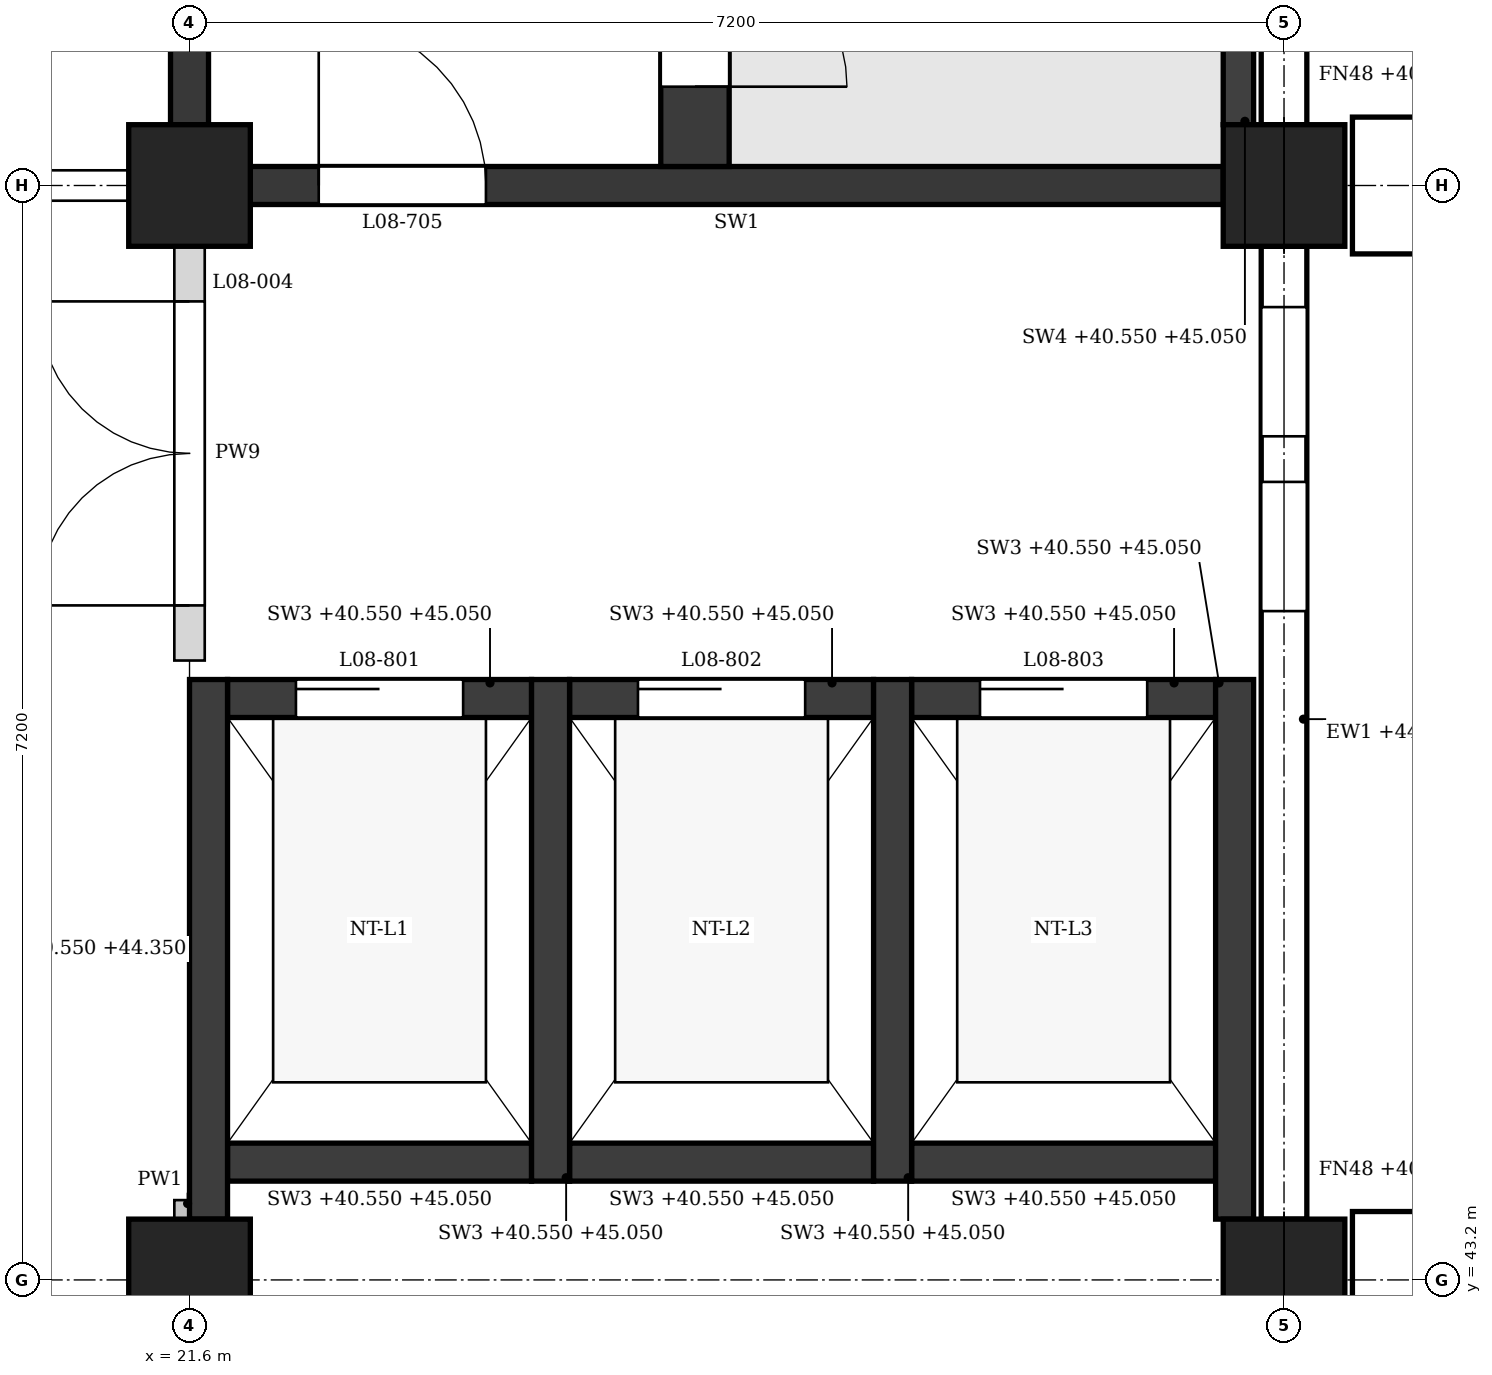
"""IFC4 building model, lengths in metres.
Left out: names, types, materials, properties, quantities, classifications, styles, units other than length and angle.
Written with IfcOpenShell. Run it as: python <this file> out.ifc"""

import sys

from ifc_helpers import new_model, si_unit, direction, frame, frame_2d, origin, origin_2d, place, context, subcontext, project, spatial, polyline, rectangle, outline, extrude, element, fill, save


model = new_model("IFC4")
c1 = context("Model", 3, precision=1e-05, world=origin(), true_north=direction((0.0, 1.0)))
c2 = subcontext(c1, "Body", "Model", "MODEL_VIEW")
j1 = project(units=[si_unit("LENGTHUNIT", "METRE"), si_unit("PLANEANGLEUNIT", "RADIAN")], contexts=[c1])
p1 = place(None, origin())
s1 = spatial("IfcSite", under=j1, at=p1, CompositionType="ELEMENT")
p2 = place(p1, origin())
s2 = spatial("IfcBuilding", under=s1, at=p2, CompositionType="ELEMENT")
p3 = place(p2, frame((0.0, 0.0, 40.8)))
s3 = spatial("IfcBuildingStorey", under=s2, at=p3, CompositionType="ELEMENT", Elevation=40.8)
for number, where, z_axis, x_axis in (
    (1, (21.6, 43.2, 0.0), (0.0, 0.0, 1.0), (1.0, 0.0, 0.0)),
    (2, (21.6, 50.4, 0.0), (0.0, 0.0, 1.0), (1.0, 0.0, 0.0)),
    (3, (28.8, 43.2, 0.0), (0.0, 0.0, 1.0), (1.0, 0.0, 0.0)),
    (4, (28.8, 50.4, 0.0), (0.0, 0.0, 1.0), (1.0, 0.0, 0.0)),
):
    element("IfcColumn", number, at=place(p3, frame(where, z_axis=z_axis, x_axis=x_axis)), inside=s3, PredefinedType="COLUMN", context=c2, shape_type="SweptSolid", body=[
        extrude(rectangle(XDim=0.8, YDim=0.8, at=origin_2d()), origin(), (0.0, 0.0, 1.0), 4.5),
    ])
p4 = place(p3, frame((28.8, 43.6, 0.0), z_axis=(0.0, 0.0, 1.0), x_axis=(0.0, 1.0, 0.0)))
e5 = element("IfcWall", 5, at=p4, inside=s3, PredefinedType="STANDARD", context=c2, shape_type="SweptSolid", body=[
    extrude(rectangle(XDim=6.4, YDim=0.3, at=frame_2d((3.2, 0.0))), origin(), (0.0, 0.0, 1.0), 3.65),
])
p5 = place(p4, frame((4.0, 0.0, 0.9)))
e6 = element("IfcOpeningElement", 6, at=p5, cuts=e5, PredefinedType="OPENING", context=c2, shape_type="SweptSolid", body=[
    extrude(outline(polyline([(0.0, 0.0), (0.85, 0.0), (0.85, 2.25), (0.425, 2.7), (0.0, 2.25), (0.0, 0.0)])), frame((0.0, 0.16, 0.0), z_axis=(0.0, -1.0, 0.0), x_axis=(1.0, 0.0, 0.0)), (0.0, 0.0, 1.0), 0.32),
])
p6 = place(p4, frame((5.15, 0.0, 0.9)))
e7 = element("IfcOpeningElement", 7, at=p6, cuts=e5, PredefinedType="OPENING", context=c2, shape_type="SweptSolid", body=[
    extrude(outline(polyline([(0.0, 0.0), (0.85, 0.0), (0.85, 2.25), (0.425, 2.7), (0.0, 2.25), (0.0, 0.0)])), frame((0.0, 0.16, 0.0), z_axis=(0.0, -1.0, 0.0), x_axis=(1.0, 0.0, 0.0)), (0.0, 0.0, 1.0), 0.32),
])
p7 = place(p3, frame((28.8, 50.8, 0.0), z_axis=(0.0, 0.0, 1.0), x_axis=(0.0, 1.0, 0.0)))
e8 = element("IfcWall", 8, at=p7, inside=s3, PredefinedType="STANDARD", context=c2, shape_type="SweptSolid", body=[
    extrude(rectangle(XDim=6.4, YDim=0.3, at=frame_2d((3.2, 0.0))), origin(), (0.0, 0.0, 1.0), 3.65),
])
p8 = place(p7, frame((0.95, 0.0, 0.9)))
e9 = element("IfcOpeningElement", 9, at=p8, cuts=e8, PredefinedType="OPENING", context=c2, shape_type="SweptSolid", body=[
    extrude(outline(polyline([(0.0, 0.0), (0.9, 0.0), (0.9, 2.25), (0.45, 2.7), (0.0, 2.25), (0.0, 0.0)])), frame((0.0, 0.16, 0.0), z_axis=(0.0, -1.0, 0.0), x_axis=(1.0, 0.0, 0.0)), (0.0, 0.0, 1.0), 0.32),
])
p9 = place(p7, frame((4.55, 0.0, 0.9)))
e10 = element("IfcOpeningElement", 10, at=p9, cuts=e8, PredefinedType="OPENING", context=c2, shape_type="SweptSolid", body=[
    extrude(outline(polyline([(0.0, 0.0), (0.9, 0.0), (0.9, 2.25), (0.45, 2.7), (0.0, 2.25), (0.0, 0.0)])), frame((0.0, 0.16, 0.0), z_axis=(0.0, -1.0, 0.0), x_axis=(1.0, 0.0, 0.0)), (0.0, 0.0, 1.0), 0.32),
])
for number, where, z_axis, x_axis in (
    (11, (29.25, 43.2, -0.25), (0.0, 0.0, 1.0), (1.0, 0.0, 0.0)),
    (12, (29.25, 50.4, -0.25), (0.0, 0.0, 1.0), (1.0, 0.0, 0.0)),
):
    element("IfcWall", number, at=place(p3, frame(where, z_axis=z_axis, x_axis=x_axis)), inside=s3, PredefinedType="POLYGONAL", context=c2, shape_type="SweptSolid", body=[
        extrude(outline(polyline([(1.1, 0.0), (1.1, 12.325), (0.15, 13.75), (0.0, 13.75), (0.0, 0.0), (1.1, 0.0)])), frame((0.0, 0.45, 0.0), z_axis=(0.0, -1.0, 0.0), x_axis=(1.0, 0.0, 0.0)), (0.0, 0.0, 1.0), 0.9),
    ])
p10 = place(p3, frame((22.0, 50.4, 0.0), z_axis=(0.0, 0.0, 1.0), x_axis=(1.0, 0.0, 0.0)))
e13 = element("IfcWall", 13, at=p10, inside=s3, PredefinedType="SHEAR", context=c2, shape_type="SweptSolid", body=[
    extrude(rectangle(XDim=6.4, YDim=0.25, at=frame_2d((3.2, 0.0))), origin(), (0.0, 0.0, 1.0), 3.55),
])
p11 = place(p10, frame((0.45, 0.0, 0.0)))
e14 = element("IfcOpeningElement", 14, at=p11, cuts=e13, PredefinedType="OPENING", context=c2, shape_type="SweptSolid", body=[
    extrude(rectangle(XDim=1.1, YDim=2.1, at=frame_2d((0.55, 1.05))), frame((0.0, 0.135, 0.0), z_axis=(0.0, -1.0, 0.0), x_axis=(1.0, 0.0, 0.0)), (0.0, 0.0, 1.0), 0.27),
])
p12 = place(p3, frame((21.6, 50.8, 0.0), z_axis=(0.0, 0.0, 1.0), x_axis=(0.0, 1.0, 0.0)))
e15 = element("IfcWall", 15, at=p12, inside=s3, PredefinedType="SHEAR", context=c2, shape_type="SweptSolid", body=[
    extrude(rectangle(XDim=6.4, YDim=0.25, at=frame_2d((3.2, 0.0))), origin(), (0.0, 0.0, 1.0), 3.55),
])
p13 = place(p3, frame((28.5, 50.8, -0.25), z_axis=(0.0, 0.0, 1.0), x_axis=(0.0, 1.0, 0.0)))
e16 = element("IfcWall", 16, at=p13, inside=s3, PredefinedType="SHEAR", context=c2, shape_type="SweptSolid", body=[
    extrude(rectangle(XDim=0.95, YDim=0.2, at=frame_2d((0.475, 0.0))), origin(), (0.0, 0.0, 1.0), 4.5),
])
p14 = place(p3, frame((24.925, 50.525, 0.0), z_axis=(0.0, 0.0, 1.0), x_axis=(0.0, 1.0, 0.0)))
e17 = element("IfcWall", 17, at=p14, inside=s3, PredefinedType="SHEAR", context=c2, shape_type="SweptSolid", body=[
    extrude(rectangle(XDim=6.925, YDim=0.45, at=frame_2d((3.462, 0.0))), origin(), (0.0, 0.0, 1.0), 4.25),
])
p15 = place(p14, frame((0.525, 0.0, 0.0)))
e18 = element("IfcOpeningElement", 18, at=p15, cuts=e17, PredefinedType="OPENING", context=c2, shape_type="SweptSolid", body=[
    extrude(rectangle(XDim=1.0, YDim=2.1, at=frame_2d((0.5, 1.05))), frame((0.0, 0.235, 0.0), z_axis=(0.0, -1.0, 0.0), x_axis=(1.0, 0.0, 0.0)), (0.0, 0.0, 1.0), 0.47),
])
p16 = place(p3, frame((21.725, 43.6, -0.25), z_axis=(0.0, 0.0, 1.0), x_axis=(0.0, 1.0, 0.0)))
e19 = element("IfcWall", 19, at=p16, inside=s3, PredefinedType="SHEAR", context=c2, shape_type="SweptSolid", body=[
    extrude(rectangle(XDim=3.55, YDim=0.25, at=frame_2d((1.775, 0.0))), origin(), (0.0, 0.0, 1.0), 3.8),
])
for number, where, z_axis, x_axis in (
    (20, (23.975, 43.85, -0.25), (0.0, 0.0, 1.0), (0.0, 1.0, 0.0)),
    (21, (26.225, 43.85, -0.25), (0.0, 0.0, 1.0), (0.0, 1.0, 0.0)),
):
    element("IfcWall", number, at=place(p3, frame(where, z_axis=z_axis, x_axis=x_axis)), inside=s3, PredefinedType="SHEAR", context=c2, shape_type="SweptSolid", body=[
        extrude(rectangle(XDim=3.3, YDim=0.25, at=frame_2d((1.65, 0.0))), origin(), (0.0, 0.0, 1.0), 4.5),
    ])
p17 = place(p3, frame((28.475, 43.6, -0.25), z_axis=(0.0, 0.0, 1.0), x_axis=(0.0, 1.0, 0.0)))
e22 = element("IfcWall", 22, at=p17, inside=s3, PredefinedType="SHEAR", context=c2, shape_type="SweptSolid", body=[
    extrude(rectangle(XDim=3.55, YDim=0.25, at=frame_2d((1.775, 0.0))), origin(), (0.0, 0.0, 1.0), 4.5),
])
p18 = place(p3, frame((21.85, 47.025, -0.25), z_axis=(0.0, 0.0, 1.0), x_axis=(1.0, 0.0, 0.0)))
e23 = element("IfcWall", 23, at=p18, inside=s3, PredefinedType="SHEAR", context=c2, shape_type="SweptSolid", body=[
    extrude(rectangle(XDim=2.0, YDim=0.25, at=frame_2d((1.0, 0.0))), origin(), (0.0, 0.0, 1.0), 4.5),
])
p19 = place(p18, frame((0.45, 0.0, 0.25)))
e24 = element("IfcOpeningElement", 24, at=p19, cuts=e23, PredefinedType="OPENING", context=c2, shape_type="SweptSolid", body=[
    extrude(rectangle(XDim=1.1, YDim=2.1, at=frame_2d((0.55, 1.05))), frame((0.0, 0.135, 0.0), z_axis=(0.0, -1.0, 0.0), x_axis=(1.0, 0.0, 0.0)), (0.0, 0.0, 1.0), 0.27),
])
p20 = place(p3, frame((21.85, 43.975, -0.25), z_axis=(0.0, 0.0, 1.0), x_axis=(1.0, 0.0, 0.0)))
e25 = element("IfcWall", 25, at=p20, inside=s3, PredefinedType="SHEAR", context=c2, shape_type="SweptSolid", body=[
    extrude(rectangle(XDim=2.0, YDim=0.25, at=frame_2d((1.0, 0.0))), origin(), (0.0, 0.0, 1.0), 4.5),
])
p21 = place(p3, frame((24.1, 47.025, -0.25), z_axis=(0.0, 0.0, 1.0), x_axis=(1.0, 0.0, 0.0)))
e26 = element("IfcWall", 26, at=p21, inside=s3, PredefinedType="SHEAR", context=c2, shape_type="SweptSolid", body=[
    extrude(rectangle(XDim=2.0, YDim=0.25, at=frame_2d((1.0, 0.0))), origin(), (0.0, 0.0, 1.0), 4.5),
])
p22 = place(p21, frame((0.45, 0.0, 0.25)))
e27 = element("IfcOpeningElement", 27, at=p22, cuts=e26, PredefinedType="OPENING", context=c2, shape_type="SweptSolid", body=[
    extrude(rectangle(XDim=1.1, YDim=2.1, at=frame_2d((0.55, 1.05))), frame((0.0, 0.135, 0.0), z_axis=(0.0, -1.0, 0.0), x_axis=(1.0, 0.0, 0.0)), (0.0, 0.0, 1.0), 0.27),
])
p23 = place(p3, frame((24.1, 43.975, -0.25), z_axis=(0.0, 0.0, 1.0), x_axis=(1.0, 0.0, 0.0)))
e28 = element("IfcWall", 28, at=p23, inside=s3, PredefinedType="SHEAR", context=c2, shape_type="SweptSolid", body=[
    extrude(rectangle(XDim=2.0, YDim=0.25, at=frame_2d((1.0, 0.0))), origin(), (0.0, 0.0, 1.0), 4.5),
])
p24 = place(p3, frame((26.35, 47.025, -0.25), z_axis=(0.0, 0.0, 1.0), x_axis=(1.0, 0.0, 0.0)))
e29 = element("IfcWall", 29, at=p24, inside=s3, PredefinedType="SHEAR", context=c2, shape_type="SweptSolid", body=[
    extrude(rectangle(XDim=2.0, YDim=0.25, at=frame_2d((1.0, 0.0))), origin(), (0.0, 0.0, 1.0), 4.5),
])
p25 = place(p24, frame((0.45, 0.0, 0.25)))
e30 = element("IfcOpeningElement", 30, at=p25, cuts=e29, PredefinedType="OPENING", context=c2, shape_type="SweptSolid", body=[
    extrude(rectangle(XDim=1.1, YDim=2.1, at=frame_2d((0.55, 1.05))), frame((0.0, 0.135, 0.0), z_axis=(0.0, -1.0, 0.0), x_axis=(1.0, 0.0, 0.0)), (0.0, 0.0, 1.0), 0.27),
])
p26 = place(p3, frame((26.35, 43.975, -0.25), z_axis=(0.0, 0.0, 1.0), x_axis=(1.0, 0.0, 0.0)))
e31 = element("IfcWall", 31, at=p26, inside=s3, PredefinedType="SHEAR", context=c2, shape_type="SweptSolid", body=[
    extrude(rectangle(XDim=2.0, YDim=0.25, at=frame_2d((1.0, 0.0))), origin(), (0.0, 0.0, 1.0), 4.5),
])
p27 = place(p3, frame((14.8, 50.4, 0.0), z_axis=(0.0, 0.0, 1.0), x_axis=(1.0, 0.0, 0.0)))
e32 = element("IfcWall", 32, at=p27, inside=s3, PredefinedType="PARTITIONING", context=c2, shape_type="SweptSolid", body=[
    extrude(rectangle(XDim=6.4, YDim=0.2, at=frame_2d((3.2, 0.0))), origin(), (0.0, 0.0, 1.0), 3.55),
])
p28 = place(p27, frame((4.3, 0.0, 0.0)))
e33 = element("IfcOpeningElement", 33, at=p28, cuts=e32, PredefinedType="OPENING", context=c2, shape_type="SweptSolid", body=[
    extrude(rectangle(XDim=1.0, YDim=2.1, at=frame_2d((0.5, 1.05))), frame((0.0, 0.11, 0.0), z_axis=(0.0, -1.0, 0.0), x_axis=(1.0, 0.0, 0.0)), (0.0, 0.0, 1.0), 0.22),
])
p29 = place(p3, frame((21.6, 43.6, 0.0), z_axis=(0.0, 0.0, 1.0), x_axis=(0.0, 1.0, 0.0)))
e34 = element("IfcWall", 34, at=p29, inside=s3, PredefinedType="PARTITIONING", context=c2, shape_type="SweptSolid", body=[
    extrude(rectangle(XDim=0.125, YDim=0.2, at=frame_2d((0.062, 0.0))), origin(), (0.0, 0.0, 1.0), 3.55),
])
p30 = place(p3, frame((21.6, 47.275, 0.0), z_axis=(0.0, 0.0, 1.0), x_axis=(0.0, 1.0, 0.0)))
e35 = element("IfcWall", 35, at=p30, inside=s3, PredefinedType="PARTITIONING", context=c2, shape_type="SweptSolid", body=[
    extrude(rectangle(XDim=2.725, YDim=0.2, at=frame_2d((1.363, 0.0))), origin(), (0.0, 0.0, 1.0), 3.55),
])
p31 = place(p30, frame((0.363, 0.0, 0.0)))
e36 = element("IfcOpeningElement", 36, at=p31, cuts=e35, PredefinedType="OPENING", context=c2, shape_type="SweptSolid", body=[
    extrude(rectangle(XDim=2.0, YDim=2.4, at=frame_2d((1.0, 1.2))), frame((0.0, 0.11, 0.0), z_axis=(0.0, -1.0, 0.0), x_axis=(1.0, 0.0, 0.0)), (0.0, 0.0, 1.0), 0.22),
])
p32 = place(p5, origin())
e37 = element("IfcWindow", 37, at=p32, inside=s3, PartitioningType="SINGLE_PANEL", PredefinedType="WINDOW", context=c2, shape_type="SweptSolid", body=[
    extrude(outline(polyline([(0.0, 0.0), (0.85, 0.0), (0.85, 2.25), (0.425, 2.7), (0.0, 2.25), (0.0, 0.0)])), frame((0.0, 0.03, 0.0), z_axis=(0.0, -1.0, 0.0), x_axis=(1.0, 0.0, 0.0)), (0.0, 0.0, 1.0), 0.06),
])
fill(e6, e37)
p33 = place(p6, origin())
e38 = element("IfcWindow", 38, at=p33, inside=s3, PartitioningType="SINGLE_PANEL", PredefinedType="WINDOW", context=c2, shape_type="SweptSolid", body=[
    extrude(outline(polyline([(0.0, 0.0), (0.85, 0.0), (0.85, 2.25), (0.425, 2.7), (0.0, 2.25), (0.0, 0.0)])), frame((0.0, 0.03, 0.0), z_axis=(0.0, -1.0, 0.0), x_axis=(1.0, 0.0, 0.0)), (0.0, 0.0, 1.0), 0.06),
])
fill(e7, e38)
p34 = place(p15, frame((1.0, 0.0, 0.0), z_axis=(0.0, 0.0, 1.0), x_axis=(-1.0, 0.0, 0.0)))
e39 = element("IfcDoor", 39, at=p34, inside=s3, OperationType="SINGLE_SWING_RIGHT", PredefinedType="DOOR", context=c2, shape_type="SweptSolid", body=[
    extrude(rectangle(XDim=1.0, YDim=2.1, at=frame_2d((0.5, 1.05))), frame((0.0, 0.025, 0.0), z_axis=(0.0, -1.0, 0.0), x_axis=(1.0, 0.0, 0.0)), (0.0, 0.0, 1.0), 0.05),
])
fill(e18, e39)
p35 = place(p11, origin())
e40 = element("IfcDoor", 40, at=p35, inside=s3, OperationType="SINGLE_SWING_LEFT", PredefinedType="DOOR", context=c2, shape_type="SweptSolid", body=[
    extrude(rectangle(XDim=1.1, YDim=2.1, at=frame_2d((0.55, 1.05))), frame((0.0, 0.025, 0.0), z_axis=(0.0, -1.0, 0.0), x_axis=(1.0, 0.0, 0.0)), (0.0, 0.0, 1.0), 0.05),
])
fill(e14, e40)
p36 = place(p19, origin())
e41 = element("IfcDoor", 41, at=p36, inside=s3, OperationType="SLIDING_TO_LEFT", PredefinedType="DOOR", context=c2, shape_type="SweptSolid", body=[
    extrude(rectangle(XDim=1.1, YDim=2.1, at=frame_2d((0.55, 1.05))), frame((0.0, 0.025, 0.0), z_axis=(0.0, -1.0, 0.0), x_axis=(1.0, 0.0, 0.0)), (0.0, 0.0, 1.0), 0.05),
])
fill(e24, e41)
p37 = place(p22, origin())
e42 = element("IfcDoor", 42, at=p37, inside=s3, OperationType="SLIDING_TO_LEFT", PredefinedType="DOOR", context=c2, shape_type="SweptSolid", body=[
    extrude(rectangle(XDim=1.1, YDim=2.1, at=frame_2d((0.55, 1.05))), frame((0.0, 0.025, 0.0), z_axis=(0.0, -1.0, 0.0), x_axis=(1.0, 0.0, 0.0)), (0.0, 0.0, 1.0), 0.05),
])
fill(e27, e42)
p38 = place(p25, origin())
e43 = element("IfcDoor", 43, at=p38, inside=s3, OperationType="SLIDING_TO_LEFT", PredefinedType="DOOR", context=c2, shape_type="SweptSolid", body=[
    extrude(rectangle(XDim=1.1, YDim=2.1, at=frame_2d((0.55, 1.05))), frame((0.0, 0.025, 0.0), z_axis=(0.0, -1.0, 0.0), x_axis=(1.0, 0.0, 0.0)), (0.0, 0.0, 1.0), 0.05),
])
fill(e30, e43)
p39 = place(p31, origin())
e44 = element("IfcDoor", 44, at=p39, inside=s3, OperationType="DOUBLE_DOOR_SINGLE_SWING", PredefinedType="DOOR", context=c2, shape_type="SweptSolid", body=[
    extrude(rectangle(XDim=2.0, YDim=2.4, at=frame_2d((1.0, 1.2))), frame((0.0, 0.025, 0.0), z_axis=(0.0, -1.0, 0.0), x_axis=(1.0, 0.0, 0.0)), (0.0, 0.0, 1.0), 0.05),
])
fill(e36, e44)
save(model, sys.argv[1])
